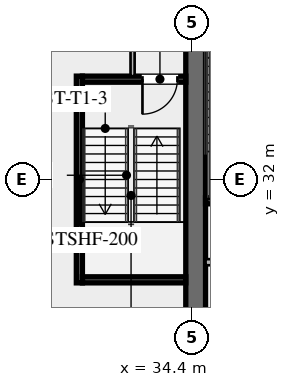
"""IFC4 building model, lengths in metres.
Left out: names, types, materials, properties, quantities, classifications, styles, units other than length and angle.
Written with IfcOpenShell. Run it as: python <this file> out.ifc"""

import sys

from ifc_helpers import new_model, si_unit, direction, frame, frame_2d, origin, place, context, subcontext, project, spatial, rectangle, extrude, element, fill, save


model = new_model("IFC4")
c1 = context("Model", 3, precision=1e-05, world=origin(), true_north=direction((0.0, 1.0)))
c2 = subcontext(c1, "Body", "Model", "MODEL_VIEW")
j1 = project(units=[si_unit("LENGTHUNIT", "METRE"), si_unit("PLANEANGLEUNIT", "RADIAN")], contexts=[c1])
p1 = place(None, origin())
s1 = spatial("IfcSite", under=j1, at=p1, CompositionType="ELEMENT")
p2 = place(p1, origin())
s2 = spatial("IfcBuilding", under=s1, at=p2, CompositionType="ELEMENT")
p3 = place(p2, frame((0.0, 0.0, 15.6)))
s3 = spatial("IfcBuildingStorey", under=s2, at=p3, CompositionType="ELEMENT", Elevation=15.6)
p4 = place(p3, frame((34.525, 24.2, 0.0), z_axis=(0.0, 0.0, 1.0), x_axis=(0.0, 1.0, 0.0)))
e1 = element("IfcWall", 1, at=p4, inside=s3, PredefinedType="SHEAR", context=c2, shape_type="SweptSolid", body=[
    extrude(rectangle(XDim=15.6, YDim=0.65, at=frame_2d((7.8, 0.0))), origin(), (0.0, 0.0, 1.0), 4.2),
])
p5 = place(p3, frame((34.85, 31.3, 0.0), z_axis=(0.0, 0.0, 1.0), x_axis=(1.0, 0.0, 0.0)))
e2 = element("IfcWall", 2, at=p5, inside=s3, PredefinedType="SHEAR", context=c2, shape_type="SweptSolid", body=[
    extrude(rectangle(XDim=3.45, YDim=0.2, at=frame_2d((1.725, 0.0))), origin(), (0.0, 0.0, 1.0), 3.9),
])
p6 = place(p3, frame((34.85, 29.28, 0.0), z_axis=(0.0, 0.0, 1.0), x_axis=(1.0, 0.0, 0.0)))
e3 = element("IfcWall", 3, at=p6, inside=s3, PredefinedType="SOLIDWALL", context=c2, shape_type="SweptSolid", body=[
    extrude(rectangle(XDim=3.1, YDim=0.2, at=frame_2d((1.55, 0.0))), origin(), (0.0, 0.0, 1.0), 3.9),
])
p7 = place(p3, frame((30.7, 28.6, 0.0), z_axis=(0.0, 0.0, 1.0), x_axis=(0.0, 1.0, 0.0)))
e4 = element("IfcWall", 4, at=p7, inside=s3, PredefinedType="SHEAR", context=c2, shape_type="SweptSolid", body=[
    extrude(rectangle(XDim=6.8, YDim=0.2, at=frame_2d((3.4, 0.0))), origin(), (0.0, 0.0, 1.0), 3.9),
])
p8 = place(p3, frame((34.2, 35.3, 0.0), z_axis=(0.0, 0.0, 1.0), x_axis=(-1.0, 0.0, 0.0)))
e5 = element("IfcWall", 5, at=p8, inside=s3, PredefinedType="SHEAR", context=c2, shape_type="SweptSolid", body=[
    extrude(rectangle(XDim=3.4, YDim=0.2, at=frame_2d((1.7, 0.0))), origin(), (0.0, 0.0, 1.0), 3.9),
])
p9 = place(p8, frame((0.275, 0.0, 0.0)))
e6 = element("IfcOpeningElement", 6, at=p9, cuts=e5, PredefinedType="OPENING", context=c2, shape_type="SweptSolid", body=[
    extrude(rectangle(XDim=1.15, YDim=2.2, at=frame_2d((0.575, 1.1))), frame((0.0, 0.11, 0.0), z_axis=(0.0, -1.0, 0.0), x_axis=(1.0, 0.0, 0.0)), (0.0, 0.0, 1.0), 0.22),
])
p10 = place(p3, frame((30.8, 28.7, 0.0), z_axis=(0.0, 0.0, 1.0), x_axis=(1.0, 0.0, 0.0)))
e7 = element("IfcWall", 7, at=p10, inside=s3, PredefinedType="SHEAR", context=c2, shape_type="SweptSolid", body=[
    extrude(rectangle(XDim=3.4, YDim=0.2, at=frame_2d((1.7, 0.0))), origin(), (0.0, 0.0, 1.0), 3.9),
])
p11 = place(p3, frame((32.45, 35.4, 0.0), z_axis=(0.0, 0.0, 1.0), x_axis=(0.0, 1.0, 0.0)))
e8 = element("IfcWall", 8, at=p11, inside=s3, PredefinedType="PARTITIONING", context=c2, shape_type="SweptSolid", body=[
    extrude(rectangle(XDim=4.45, YDim=0.135, at=frame_2d((2.225, 0.0))), origin(), (0.0, 0.0, 1.0), 2.943),
])
p12 = place(p9, origin())
e9 = element("IfcDoor", 9, at=p12, inside=s3, OperationType="SINGLE_SWING_RIGHT", PredefinedType="DOOR", context=c2, shape_type="SweptSolid", body=[
    extrude(rectangle(XDim=1.15, YDim=2.2, at=frame_2d((0.575, 1.1))), frame((0.0, 0.025, 0.0), z_axis=(0.0, -1.0, 0.0), x_axis=(1.0, 0.0, 0.0)), (0.0, 0.0, 1.0), 0.05),
])
fill(e6, e9)
save(model, sys.argv[1])
